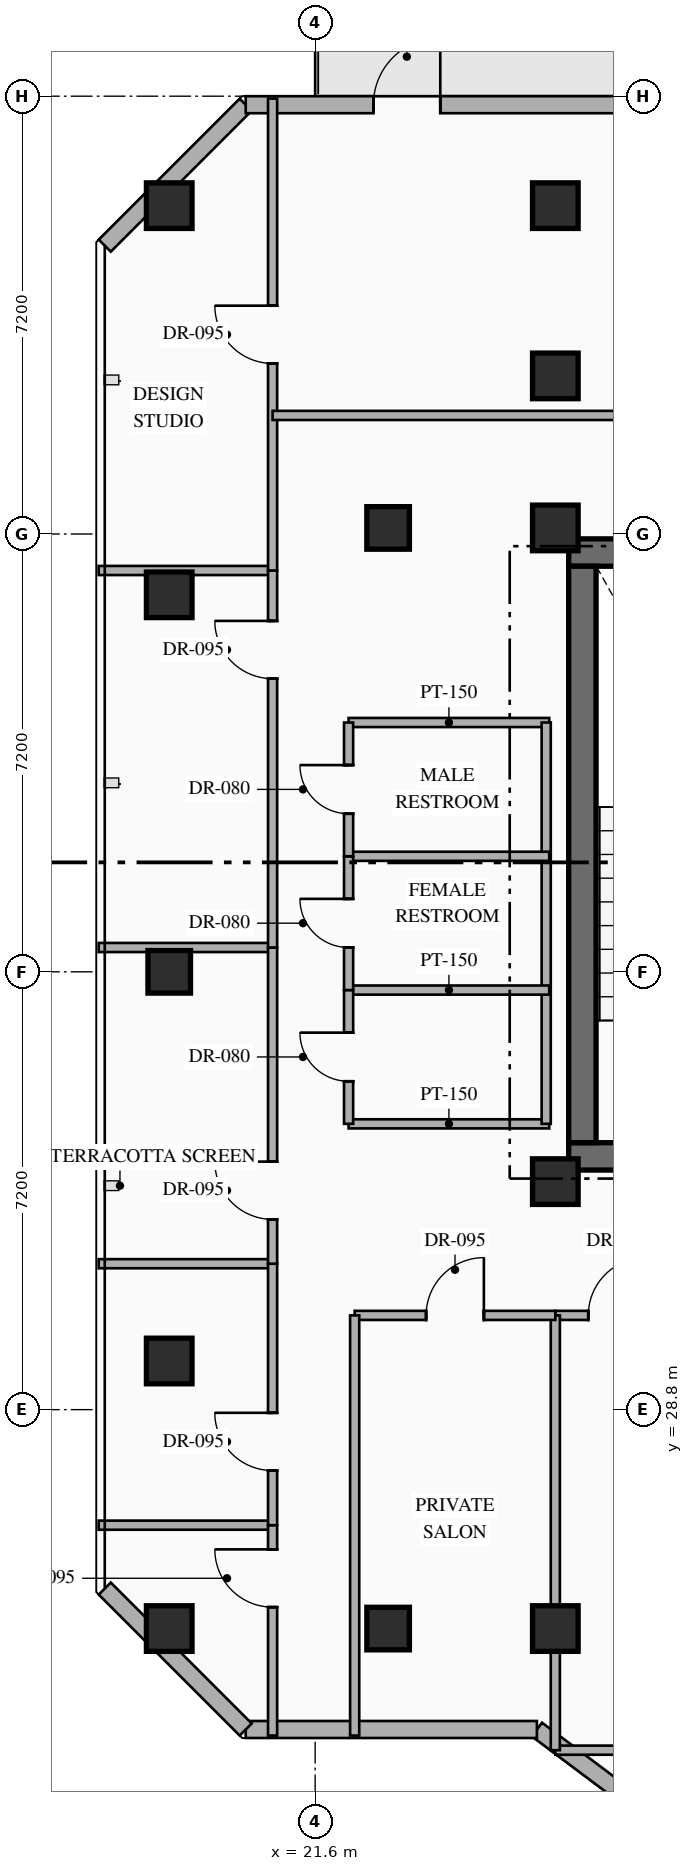
"""IFC4 building model, lengths in metres.
Left out: names, types, materials, properties, quantities, classifications, styles, units other than length and angle.
Written with IfcOpenShell. Run it as: python <this file> out.ifc"""

import sys

from ifc_helpers import new_model, si_unit, direction, frame, frame_2d, origin, origin_2d, place, context, subcontext, project, spatial, rectangle, hollow_rectangle, extrude, element, fill, save


model = new_model("IFC4")
c1 = context("Model", 3, precision=1e-05, world=origin(), true_north=direction((0.0, 1.0)))
c2 = subcontext(c1, "Body", "Model", "MODEL_VIEW")
j1 = project(units=[si_unit("LENGTHUNIT", "METRE"), si_unit("PLANEANGLEUNIT", "RADIAN")], contexts=[c1])
p1 = place(None, origin())
s1 = spatial("IfcSite", under=j1, at=p1, CompositionType="ELEMENT")
p2 = place(p1, origin())
s2 = spatial("IfcBuilding", under=s1, at=p2, CompositionType="ELEMENT")
p3 = place(p2, frame((0.0, 0.0, 198.75)))
s3 = spatial("IfcBuildingStorey", under=s2, at=p3, CompositionType="ELEMENT", Elevation=198.75)
p4 = place(p3, frame((25.77, 32.965, 0.0), z_axis=(0.0, 0.0, 1.0), x_axis=(1.0, 0.0, 0.0)))
e1 = element("IfcWall", 1, at=p4, inside=s3, PredefinedType="SHEAR", context=c2, shape_type="SweptSolid", body=[
    extrude(rectangle(XDim=7.48, YDim=0.45, at=frame_2d((3.74, 0.0))), origin(), (0.0, 0.0, 1.0), 3.6),
])
p5 = place(p4, frame((2.68, 0.0, 0.0)))
e2 = element("IfcOpeningElement", 2, at=p5, cuts=e1, PredefinedType="OPENING", context=c2, shape_type="SweptSolid", body=[
    extrude(rectangle(XDim=1.1, YDim=2.2, at=frame_2d((0.55, 1.1))), frame((0.0, 0.235, 0.0), z_axis=(0.0, -1.0, 0.0), x_axis=(1.0, 0.0, 0.0)), (0.0, 0.0, 1.0), 0.47),
])
p6 = place(p4, frame((5.43, 0.0, 0.0)))
e3 = element("IfcOpeningElement", 3, at=p6, cuts=e1, PredefinedType="OPENING", context=c2, shape_type="SweptSolid", body=[
    extrude(rectangle(XDim=1.1, YDim=2.15, at=frame_2d((0.55, 1.075))), frame((0.0, 0.235, 0.0), z_axis=(0.0, -1.0, 0.0), x_axis=(1.0, 0.0, 0.0)), (0.0, 0.0, 1.0), 0.47),
])
p7 = place(p3, frame((25.77, 42.895, 0.0), z_axis=(0.0, 0.0, 1.0), x_axis=(1.0, 0.0, 0.0)))
e4 = element("IfcWall", 4, at=p7, inside=s3, PredefinedType="SHEAR", context=c2, shape_type="SweptSolid", body=[
    extrude(rectangle(XDim=7.48, YDim=0.45, at=frame_2d((3.74, 0.0))), origin(), (0.0, 0.0, 1.0), 3.6),
])
p8 = place(p3, frame((25.995, 33.19, 0.0), z_axis=(0.0, 0.0, 1.0), x_axis=(0.0, 1.0, 0.0)))
e5 = element("IfcWall", 5, at=p8, inside=s3, PredefinedType="SHEAR", context=c2, shape_type="SweptSolid", body=[
    extrude(rectangle(XDim=9.48, YDim=0.45, at=frame_2d((4.74, 0.0))), origin(), (0.0, 0.0, 1.0), 3.6),
])
for number, where, z_axis, x_axis in (
    (6, (25.55, 32.55, 0.0), (0.0, 0.0, 1.0), (1.0, 0.0, 0.0)),
    (7, (25.55, 43.3, 0.0), (0.0, 0.0, 1.0), (1.0, 0.0, 0.0)),
    (8, (25.55, 25.2, 0.0), (0.0, 0.0, 1.0), (1.0, 0.0, 0.0)),
    (9, (25.55, 45.8, 0.0), (0.0, 0.0, 1.0), (1.0, 0.0, 0.0)),
    (10, (19.2, 48.6, 0.0), (0.0, 0.0, 1.0), (1.0, 0.0, 0.0)),
    (11, (25.55, 48.6, 0.0), (0.0, 0.0, 1.0), (1.0, 0.0, 0.0)),
    (12, (19.2, 25.2, 0.0), (0.0, 0.0, 1.0), (1.0, 0.0, 0.0)),
    (13, (19.2, 29.6, 0.0), (0.0, 0.0, 1.0), (1.0, 0.0, 0.0)),
    (14, (19.2, 42.2, 0.0), (0.0, 0.0, 1.0), (1.0, 0.0, 0.0)),
):
    element("IfcColumn", number, at=place(p3, frame(where, z_axis=z_axis, x_axis=x_axis)), inside=s3, PredefinedType="COLUMN", context=c2, shape_type="SweptSolid", body=[
        extrude(hollow_rectangle(XDim=0.75, YDim=0.75, WallThickness=0.028, at=origin_2d()), origin(), (0.0, 0.0, 1.0), 3.6),
    ])
for number, where, z_axis, x_axis in (
    (15, (22.8, 25.2, 0.0), (0.0, 0.0, 1.0), (1.0, 0.0, 0.0)),
    (16, (22.8, 43.3, 0.0), (0.0, 0.0, 1.0), (1.0, 0.0, 0.0)),
    (17, (19.2, 36.0, 0.0), (0.0, 0.0, 1.0), (1.0, 0.0, 0.0)),
):
    element("IfcColumn", number, at=place(p3, frame(where, z_axis=z_axis, x_axis=x_axis)), inside=s3, PredefinedType="COLUMN", context=c2, shape_type="SweptSolid", body=[
        extrude(hollow_rectangle(XDim=0.7, YDim=0.7, WallThickness=0.028, at=origin_2d()), origin(), (0.0, 0.0, 1.0), 3.6),
    ])
p9 = place(p3, frame((44.918, 8.787, 0.0), z_axis=(0.0, 0.0, 1.0), x_axis=(-0.800004765927, 0.599993645378, 0.0)))
e18 = element("IfcWall", 18, at=p9, inside=s3, PredefinedType="STANDARD", context=c2, shape_type="SweptSolid", body=[
    extrude(rectangle(XDim=24.588, YDim=0.28, at=frame_2d((12.294, 0.0))), origin(), (0.0, 0.0, 1.0), 3.35),
])
p10 = place(p3, frame((25.247, 23.54, 0.0), z_axis=(0.0, 0.0, 1.0), x_axis=(-1.0, 0.0, 0.0)))
e19 = element("IfcWall", 19, at=p10, inside=s3, PredefinedType="STANDARD", context=c2, shape_type="SweptSolid", body=[
    extrude(rectangle(XDim=4.789, YDim=0.28, at=frame_2d((2.395, 0.0))), origin(), (0.0, 0.0, 1.0), 3.35),
])
p11 = place(p3, frame((20.458, 23.54, 0.0), z_axis=(0.0, 0.0, 1.0), x_axis=(-0.707144017911, 0.707069542501, 0.0)))
e20 = element("IfcWall", 20, at=p11, inside=s3, PredefinedType="STANDARD", context=c2, shape_type="SweptSolid", body=[
    extrude(rectangle(XDim=3.278, YDim=0.28, at=frame_2d((1.639, 0.0))), origin(), (0.0, 0.0, 1.0), 3.35),
])
p12 = place(p3, frame((18.14, 47.942, 0.0), z_axis=(0.0, 0.0, 1.0), x_axis=(0.707106781187, 0.707106781187, 0.0)))
e21 = element("IfcWall", 21, at=p12, inside=s3, PredefinedType="STANDARD", context=c2, shape_type="SweptSolid", body=[
    extrude(rectangle(XDim=3.278, YDim=0.28, at=frame_2d((1.639, 0.0))), origin(), (0.0, 0.0, 1.0), 3.35),
])
p13 = place(p3, frame((20.458, 50.26, 0.0), z_axis=(0.0, 0.0, 1.0), x_axis=(1.0, 0.0, 0.0)))
e22 = element("IfcWall", 22, at=p13, inside=s3, PredefinedType="STANDARD", context=c2, shape_type="SweptSolid", body=[
    extrude(rectangle(XDim=22.084, YDim=0.28, at=frame_2d((11.042, 0.0))), origin(), (0.0, 0.0, 1.0), 3.35),
])
p14 = place(p13, frame((2.1, 0.0, 0.0)))
e23 = element("IfcOpeningElement", 23, at=p14, cuts=e22, PredefinedType="OPENING", context=c2, shape_type="SweptSolid", body=[
    extrude(rectangle(XDim=1.1, YDim=2.2, at=frame_2d((0.55, 1.1))), frame((0.0, 0.15, 0.0), z_axis=(0.0, -1.0, 0.0), x_axis=(1.0, 0.0, 0.0)), (0.0, 0.0, 1.0), 0.3),
])
p15 = place(p13, frame((15.663, 0.0, 0.85)))
e24 = element("IfcOpeningElement", 24, at=p15, cuts=e22, PredefinedType="OPENING", context=c2, shape_type="SweptSolid", body=[
    extrude(rectangle(XDim=1.8, YDim=2.1, at=frame_2d((0.9, 1.05))), frame((0.0, 0.15, 0.0), z_axis=(0.0, -1.0, 0.0), x_axis=(1.0, 0.0, 0.0)), (0.0, 0.0, 1.0), 0.3),
])
for number, where, z_axis, x_axis in (
    (25, (22.15, 33.5, 0.0), (0.0, 0.0, 1.0), (1.0, 0.0, 0.0)),
    (26, (22.15, 40.1, 0.0), (0.0, 0.0, 1.0), (1.0, 0.0, 0.0)),
):
    element("IfcWall", number, at=place(p3, frame(where, z_axis=z_axis, x_axis=x_axis)), inside=s3, PredefinedType="PARTITIONING", context=c2, shape_type="SweptSolid", body=[
        extrude(rectangle(XDim=3.3, YDim=0.15, at=frame_2d((1.65, 0.0))), origin(), (0.0, 0.0, 1.0), 3.35),
    ])
p16 = place(p3, frame((25.4, 33.5, 0.0), z_axis=(0.0, 0.0, 1.0), x_axis=(0.0, 1.0, 0.0)))
e27 = element("IfcWall", 27, at=p16, inside=s3, PredefinedType="PARTITIONING", context=c2, shape_type="SweptSolid", body=[
    extrude(rectangle(XDim=6.6, YDim=0.15, at=frame_2d((3.3, 0.0))), origin(), (0.0, 0.0, 1.0), 3.35),
])
for number, where, z_axis, x_axis in (
    (28, (22.15, 35.7, 0.0), (0.0, 0.0, 1.0), (1.0, 0.0, 0.0)),
    (29, (22.15, 37.9, 0.0), (0.0, 0.0, 1.0), (1.0, 0.0, 0.0)),
):
    element("IfcWall", number, at=place(p3, frame(where, z_axis=z_axis, x_axis=x_axis)), inside=s3, PredefinedType="PARTITIONING", context=c2, shape_type="SweptSolid", body=[
        extrude(rectangle(XDim=3.3, YDim=0.15, at=frame_2d((1.65, 0.0))), origin(), (0.0, 0.0, 1.0), 3.35),
    ])
p17 = place(p3, frame((22.15, 33.5, 0.0), z_axis=(0.0, 0.0, 1.0), x_axis=(0.0, 1.0, 0.0)))
e30 = element("IfcWall", 30, at=p17, inside=s3, PredefinedType="PARTITIONING", context=c2, shape_type="SweptSolid", body=[
    extrude(rectangle(XDim=2.2, YDim=0.15, at=frame_2d((1.1, 0.0))), origin(), (0.0, 0.0, 1.0), 3.35),
])
p18 = place(p17, frame((0.7, 0.0, 0.0)))
e31 = element("IfcOpeningElement", 31, at=p18, cuts=e30, PredefinedType="OPENING", context=c2, shape_type="SweptSolid", body=[
    extrude(rectangle(XDim=0.8, YDim=2.06, at=frame_2d((0.4, 1.03))), frame((0.0, 0.085, 0.0), z_axis=(0.0, -1.0, 0.0), x_axis=(1.0, 0.0, 0.0)), (0.0, 0.0, 1.0), 0.17),
])
p19 = place(p3, frame((22.15, 35.7, 0.0), z_axis=(0.0, 0.0, 1.0), x_axis=(0.0, 1.0, 0.0)))
e32 = element("IfcWall", 32, at=p19, inside=s3, PredefinedType="PARTITIONING", context=c2, shape_type="SweptSolid", body=[
    extrude(rectangle(XDim=2.2, YDim=0.15, at=frame_2d((1.1, 0.0))), origin(), (0.0, 0.0, 1.0), 3.35),
])
p20 = place(p19, frame((0.7, 0.0, 0.0)))
e33 = element("IfcOpeningElement", 33, at=p20, cuts=e32, PredefinedType="OPENING", context=c2, shape_type="SweptSolid", body=[
    extrude(rectangle(XDim=0.8, YDim=2.06, at=frame_2d((0.4, 1.03))), frame((0.0, 0.085, 0.0), z_axis=(0.0, -1.0, 0.0), x_axis=(1.0, 0.0, 0.0)), (0.0, 0.0, 1.0), 0.17),
])
p21 = place(p3, frame((22.15, 37.9, 0.0), z_axis=(0.0, 0.0, 1.0), x_axis=(0.0, 1.0, 0.0)))
e34 = element("IfcWall", 34, at=p21, inside=s3, PredefinedType="PARTITIONING", context=c2, shape_type="SweptSolid", body=[
    extrude(rectangle(XDim=2.2, YDim=0.15, at=frame_2d((1.1, 0.0))), origin(), (0.0, 0.0, 1.0), 3.35),
])
p22 = place(p21, frame((0.7, 0.0, 0.0)))
e35 = element("IfcOpeningElement", 35, at=p22, cuts=e34, PredefinedType="OPENING", context=c2, shape_type="SweptSolid", body=[
    extrude(rectangle(XDim=0.8, YDim=2.06, at=frame_2d((0.4, 1.03))), frame((0.0, 0.085, 0.0), z_axis=(0.0, -1.0, 0.0), x_axis=(1.0, 0.0, 0.0)), (0.0, 0.0, 1.0), 0.17),
])
p23 = place(p3, frame((25.55, 23.2, 0.0), z_axis=(0.0, 0.0, 1.0), x_axis=(1.0, 0.0, 0.0)))
e36 = element("IfcWall", 36, at=p23, inside=s3, PredefinedType="PARTITIONING", context=c2, shape_type="SweptSolid", body=[
    extrude(rectangle(XDim=4.95, YDim=0.15, at=frame_2d((2.475, 0.0))), origin(), (0.0, 0.0, 1.0), 3.35),
])
p24 = place(p3, frame((25.55, 30.35, 0.0), z_axis=(0.0, 0.0, 1.0), x_axis=(1.0, 0.0, 0.0)))
e37 = element("IfcWall", 37, at=p24, inside=s3, PredefinedType="PARTITIONING", context=c2, shape_type="SweptSolid", body=[
    extrude(rectangle(XDim=4.95, YDim=0.15, at=frame_2d((2.475, 0.0))), origin(), (0.0, 0.0, 1.0), 3.35),
])
p25 = place(p24, frame((0.542, 0.0, 0.0)))
e38 = element("IfcOpeningElement", 38, at=p25, cuts=e37, PredefinedType="OPENING", context=c2, shape_type="SweptSolid", body=[
    extrude(rectangle(XDim=0.95, YDim=2.15, at=frame_2d((0.475, 1.075))), frame((0.0, 0.085, 0.0), z_axis=(0.0, -1.0, 0.0), x_axis=(1.0, 0.0, 0.0)), (0.0, 0.0, 1.0), 0.17),
])
p26 = place(p3, frame((25.55, 23.2, 0.0), z_axis=(0.0, 0.0, 1.0), x_axis=(0.0, 1.0, 0.0)))
e39 = element("IfcWall", 39, at=p26, inside=s3, PredefinedType="PARTITIONING", context=c2, shape_type="SweptSolid", body=[
    extrude(rectangle(XDim=7.15, YDim=0.15, at=frame_2d((3.575, 0.0))), origin(), (0.0, 0.0, 1.0), 2.757),
])
p27 = place(p3, frame((18.04, 26.9, 0.0), z_axis=(0.0, 0.0, 1.0), x_axis=(1.0, 0.0, 0.0)))
e40 = element("IfcWall", 40, at=p27, inside=s3, PredefinedType="PARTITIONING", context=c2, shape_type="SweptSolid", body=[
    extrude(rectangle(XDim=2.86, YDim=0.15, at=frame_2d((1.43, 0.0))), origin(), (0.0, 0.0, 1.0), 3.35),
])
p28 = place(p3, frame((20.9, 23.44, 0.0), z_axis=(0.0, 0.0, 1.0), x_axis=(0.0, 1.0, 0.0)))
e41 = element("IfcWall", 41, at=p28, inside=s3, PredefinedType="PARTITIONING", context=c2, shape_type="SweptSolid", body=[
    extrude(rectangle(XDim=3.46, YDim=0.15, at=frame_2d((1.73, 0.0))), origin(), (0.0, 0.0, 1.0), 3.35),
])
p29 = place(p28, frame((2.112, 0.0, 0.0)))
e42 = element("IfcOpeningElement", 42, at=p29, cuts=e41, PredefinedType="OPENING", context=c2, shape_type="SweptSolid", body=[
    extrude(rectangle(XDim=0.95, YDim=2.15, at=frame_2d((0.475, 1.075))), frame((0.0, 0.085, 0.0), z_axis=(0.0, -1.0, 0.0), x_axis=(1.0, 0.0, 0.0)), (0.0, 0.0, 1.0), 0.17),
])
p30 = place(p3, frame((18.04, 31.2, 0.0), z_axis=(0.0, 0.0, 1.0), x_axis=(1.0, 0.0, 0.0)))
e43 = element("IfcWall", 43, at=p30, inside=s3, PredefinedType="PARTITIONING", context=c2, shape_type="SweptSolid", body=[
    extrude(rectangle(XDim=2.86, YDim=0.15, at=frame_2d((1.43, 0.0))), origin(), (0.0, 0.0, 1.0), 3.35),
])
p31 = place(p3, frame((20.9, 26.9, 0.0), z_axis=(0.0, 0.0, 1.0), x_axis=(0.0, 1.0, 0.0)))
e44 = element("IfcWall", 44, at=p31, inside=s3, PredefinedType="PARTITIONING", context=c2, shape_type="SweptSolid", body=[
    extrude(rectangle(XDim=4.3, YDim=0.15, at=frame_2d((2.15, 0.0))), origin(), (0.0, 0.0, 1.0), 3.35),
])
p32 = place(p31, frame((0.898, 0.0, 0.0)))
e45 = element("IfcOpeningElement", 45, at=p32, cuts=e44, PredefinedType="OPENING", context=c2, shape_type="SweptSolid", body=[
    extrude(rectangle(XDim=0.95, YDim=2.15, at=frame_2d((0.475, 1.075))), frame((0.0, 0.085, 0.0), z_axis=(0.0, -1.0, 0.0), x_axis=(1.0, 0.0, 0.0)), (0.0, 0.0, 1.0), 0.17),
])
p33 = place(p3, frame((18.04, 36.4, 0.0), z_axis=(0.0, 0.0, 1.0), x_axis=(1.0, 0.0, 0.0)))
e46 = element("IfcWall", 46, at=p33, inside=s3, PredefinedType="PARTITIONING", context=c2, shape_type="SweptSolid", body=[
    extrude(rectangle(XDim=2.86, YDim=0.15, at=frame_2d((1.43, 0.0))), origin(), (0.0, 0.0, 1.0), 3.35),
])
p34 = place(p3, frame((20.9, 31.2, 0.0), z_axis=(0.0, 0.0, 1.0), x_axis=(0.0, 1.0, 0.0)))
e47 = element("IfcWall", 47, at=p34, inside=s3, PredefinedType="PARTITIONING", context=c2, shape_type="SweptSolid", body=[
    extrude(rectangle(XDim=5.2, YDim=0.15, at=frame_2d((2.6, 0.0))), origin(), (0.0, 0.0, 1.0), 3.35),
])
p35 = place(p34, frame((0.729, 0.0, 0.0)))
e48 = element("IfcOpeningElement", 48, at=p35, cuts=e47, PredefinedType="OPENING", context=c2, shape_type="SweptSolid", body=[
    extrude(rectangle(XDim=0.95, YDim=2.15, at=frame_2d((0.475, 1.075))), frame((0.0, 0.085, 0.0), z_axis=(0.0, -1.0, 0.0), x_axis=(1.0, 0.0, 0.0)), (0.0, 0.0, 1.0), 0.17),
])
p36 = place(p3, frame((18.04, 42.6, 0.0), z_axis=(0.0, 0.0, 1.0), x_axis=(1.0, 0.0, 0.0)))
e49 = element("IfcWall", 49, at=p36, inside=s3, PredefinedType="PARTITIONING", context=c2, shape_type="SweptSolid", body=[
    extrude(rectangle(XDim=2.86, YDim=0.15, at=frame_2d((1.43, 0.0))), origin(), (0.0, 0.0, 1.0), 3.35),
])
p37 = place(p3, frame((20.9, 36.4, 0.0), z_axis=(0.0, 0.0, 1.0), x_axis=(0.0, 1.0, 0.0)))
e50 = element("IfcWall", 50, at=p37, inside=s3, PredefinedType="PARTITIONING", context=c2, shape_type="SweptSolid", body=[
    extrude(rectangle(XDim=6.2, YDim=0.15, at=frame_2d((3.1, 0.0))), origin(), (0.0, 0.0, 1.0), 3.35),
])
p38 = place(p37, frame((4.421, 0.0, 0.0)))
e51 = element("IfcOpeningElement", 51, at=p38, cuts=e50, PredefinedType="OPENING", context=c2, shape_type="SweptSolid", body=[
    extrude(rectangle(XDim=0.95, YDim=2.15, at=frame_2d((0.475, 1.075))), frame((0.0, 0.085, 0.0), z_axis=(0.0, -1.0, 0.0), x_axis=(1.0, 0.0, 0.0)), (0.0, 0.0, 1.0), 0.17),
])
p39 = place(p3, frame((20.9, 42.6, 0.0), z_axis=(0.0, 0.0, 1.0), x_axis=(0.0, 1.0, 0.0)))
e52 = element("IfcWall", 52, at=p39, inside=s3, PredefinedType="PARTITIONING", context=c2, shape_type="SweptSolid", body=[
    extrude(rectangle(XDim=7.76, YDim=0.15, at=frame_2d((3.88, 0.0))), origin(), (0.0, 0.0, 1.0), 3.35),
])
p40 = place(p39, frame((3.405, 0.0, 0.0)))
e53 = element("IfcOpeningElement", 53, at=p40, cuts=e52, PredefinedType="OPENING", context=c2, shape_type="SweptSolid", body=[
    extrude(rectangle(XDim=0.95, YDim=2.15, at=frame_2d((0.475, 1.075))), frame((0.0, 0.085, 0.0), z_axis=(0.0, -1.0, 0.0), x_axis=(1.0, 0.0, 0.0)), (0.0, 0.0, 1.0), 0.17),
])
p41 = place(p3, frame((20.9, 45.15, 0.0), z_axis=(0.0, 0.0, 1.0), x_axis=(1.0, 0.0, 0.0)))
e54 = element("IfcWall", 54, at=p41, inside=s3, PredefinedType="PARTITIONING", context=c2, shape_type="SweptSolid", body=[
    extrude(rectangle(XDim=24.06, YDim=0.15, at=frame_2d((12.03, 0.0))), origin(), (0.0, 0.0, 1.0), 3.35),
])
p42 = place(p41, frame((9.32, 0.0, 0.0)))
e55 = element("IfcOpeningElement", 55, at=p42, cuts=e54, PredefinedType="OPENING", context=c2, shape_type="SweptSolid", body=[
    extrude(rectangle(XDim=0.95, YDim=2.15, at=frame_2d((0.475, 1.075))), frame((0.0, 0.085, 0.0), z_axis=(0.0, -1.0, 0.0), x_axis=(1.0, 0.0, 0.0)), (0.0, 0.0, 1.0), 0.17),
])
p43 = place(p3, frame((22.25, 30.35, 0.0), z_axis=(0.0, 0.0, 1.0), x_axis=(1.0, 0.0, 0.0)))
e56 = element("IfcWall", 56, at=p43, inside=s3, PredefinedType="PARTITIONING", context=c2, shape_type="SweptSolid", body=[
    extrude(rectangle(XDim=3.3, YDim=0.15, at=frame_2d((1.65, 0.0))), origin(), (0.0, 0.0, 1.0), 3.35),
])
p44 = place(p43, frame((1.175, 0.0, 0.0)))
e57 = element("IfcOpeningElement", 57, at=p44, cuts=e56, PredefinedType="OPENING", context=c2, shape_type="SweptSolid", body=[
    extrude(rectangle(XDim=0.95, YDim=2.15, at=frame_2d((0.475, 1.075))), frame((0.0, 0.085, 0.0), z_axis=(0.0, -1.0, 0.0), x_axis=(1.0, 0.0, 0.0)), (0.0, 0.0, 1.0), 0.17),
])
p45 = place(p3, frame((22.25, 23.44, 0.0), z_axis=(0.0, 0.0, 1.0), x_axis=(0.0, 1.0, 0.0)))
e58 = element("IfcWall", 58, at=p45, inside=s3, PredefinedType="PARTITIONING", context=c2, shape_type="SweptSolid", body=[
    extrude(rectangle(XDim=6.91, YDim=0.15, at=frame_2d((3.455, 0.0))), origin(), (0.0, 0.0, 1.0), 3.35),
])
p46 = place(p14, origin())
e59 = element("IfcDoor", 59, at=p46, inside=s3, OperationType="SINGLE_SWING_RIGHT", PredefinedType="DOOR", context=c2, shape_type="SweptSolid", body=[
    extrude(rectangle(XDim=1.1, YDim=2.2, at=frame_2d((0.55, 1.1))), frame((0.0, 0.025, 0.0), z_axis=(0.0, -1.0, 0.0), x_axis=(1.0, 0.0, 0.0)), (0.0, 0.0, 1.0), 0.05),
])
fill(e23, e59)
p47 = place(p18, origin())
e60 = element("IfcDoor", 60, at=p47, inside=s3, OperationType="SINGLE_SWING_RIGHT", PredefinedType="DOOR", context=c2, shape_type="SweptSolid", body=[
    extrude(rectangle(XDim=0.8, YDim=2.06, at=frame_2d((0.4, 1.03))), frame((0.0, 0.025, 0.0), z_axis=(0.0, -1.0, 0.0), x_axis=(1.0, 0.0, 0.0)), (0.0, 0.0, 1.0), 0.05),
])
fill(e31, e60)
p48 = place(p20, origin())
e61 = element("IfcDoor", 61, at=p48, inside=s3, OperationType="SINGLE_SWING_RIGHT", PredefinedType="DOOR", context=c2, shape_type="SweptSolid", body=[
    extrude(rectangle(XDim=0.8, YDim=2.06, at=frame_2d((0.4, 1.03))), frame((0.0, 0.025, 0.0), z_axis=(0.0, -1.0, 0.0), x_axis=(1.0, 0.0, 0.0)), (0.0, 0.0, 1.0), 0.05),
])
fill(e33, e61)
p49 = place(p22, origin())
e62 = element("IfcDoor", 62, at=p49, inside=s3, OperationType="SINGLE_SWING_RIGHT", PredefinedType="DOOR", context=c2, shape_type="SweptSolid", body=[
    extrude(rectangle(XDim=0.8, YDim=2.06, at=frame_2d((0.4, 1.03))), frame((0.0, 0.025, 0.0), z_axis=(0.0, -1.0, 0.0), x_axis=(1.0, 0.0, 0.0)), (0.0, 0.0, 1.0), 0.05),
])
fill(e35, e62)
p50 = place(p25, origin())
e63 = element("IfcDoor", 63, at=p50, inside=s3, OperationType="SINGLE_SWING_RIGHT", PredefinedType="DOOR", context=c2, shape_type="SweptSolid", body=[
    extrude(rectangle(XDim=0.95, YDim=2.15, at=frame_2d((0.475, 1.075))), frame((0.0, 0.025, 0.0), z_axis=(0.0, -1.0, 0.0), x_axis=(1.0, 0.0, 0.0)), (0.0, 0.0, 1.0), 0.05),
])
fill(e38, e63)
p51 = place(p29, origin())
e64 = element("IfcDoor", 64, at=p51, inside=s3, OperationType="SINGLE_SWING_RIGHT", PredefinedType="DOOR", context=c2, shape_type="SweptSolid", body=[
    extrude(rectangle(XDim=0.95, YDim=2.15, at=frame_2d((0.475, 1.075))), frame((0.0, 0.025, 0.0), z_axis=(0.0, -1.0, 0.0), x_axis=(1.0, 0.0, 0.0)), (0.0, 0.0, 1.0), 0.05),
])
fill(e42, e64)
p52 = place(p32, origin())
e65 = element("IfcDoor", 65, at=p52, inside=s3, OperationType="SINGLE_SWING_RIGHT", PredefinedType="DOOR", context=c2, shape_type="SweptSolid", body=[
    extrude(rectangle(XDim=0.95, YDim=2.15, at=frame_2d((0.475, 1.075))), frame((0.0, 0.025, 0.0), z_axis=(0.0, -1.0, 0.0), x_axis=(1.0, 0.0, 0.0)), (0.0, 0.0, 1.0), 0.05),
])
fill(e45, e65)
p53 = place(p35, origin())
e66 = element("IfcDoor", 66, at=p53, inside=s3, OperationType="SINGLE_SWING_RIGHT", PredefinedType="DOOR", context=c2, shape_type="SweptSolid", body=[
    extrude(rectangle(XDim=0.95, YDim=2.15, at=frame_2d((0.475, 1.075))), frame((0.0, 0.025, 0.0), z_axis=(0.0, -1.0, 0.0), x_axis=(1.0, 0.0, 0.0)), (0.0, 0.0, 1.0), 0.05),
])
fill(e48, e66)
p54 = place(p38, origin())
e67 = element("IfcDoor", 67, at=p54, inside=s3, OperationType="SINGLE_SWING_RIGHT", PredefinedType="DOOR", context=c2, shape_type="SweptSolid", body=[
    extrude(rectangle(XDim=0.95, YDim=2.15, at=frame_2d((0.475, 1.075))), frame((0.0, 0.025, 0.0), z_axis=(0.0, -1.0, 0.0), x_axis=(1.0, 0.0, 0.0)), (0.0, 0.0, 1.0), 0.05),
])
fill(e51, e67)
p55 = place(p40, origin())
e68 = element("IfcDoor", 68, at=p55, inside=s3, OperationType="SINGLE_SWING_RIGHT", PredefinedType="DOOR", context=c2, shape_type="SweptSolid", body=[
    extrude(rectangle(XDim=0.95, YDim=2.15, at=frame_2d((0.475, 1.075))), frame((0.0, 0.025, 0.0), z_axis=(0.0, -1.0, 0.0), x_axis=(1.0, 0.0, 0.0)), (0.0, 0.0, 1.0), 0.05),
])
fill(e53, e68)
p56 = place(p44, origin())
e69 = element("IfcDoor", 69, at=p56, inside=s3, OperationType="SINGLE_SWING_RIGHT", PredefinedType="DOOR", context=c2, shape_type="SweptSolid", body=[
    extrude(rectangle(XDim=0.95, YDim=2.15, at=frame_2d((0.475, 1.075))), frame((0.0, 0.025, 0.0), z_axis=(0.0, -1.0, 0.0), x_axis=(1.0, 0.0, 0.0)), (0.0, 0.0, 1.0), 0.05),
])
fill(e57, e69)
save(model, sys.argv[1])
